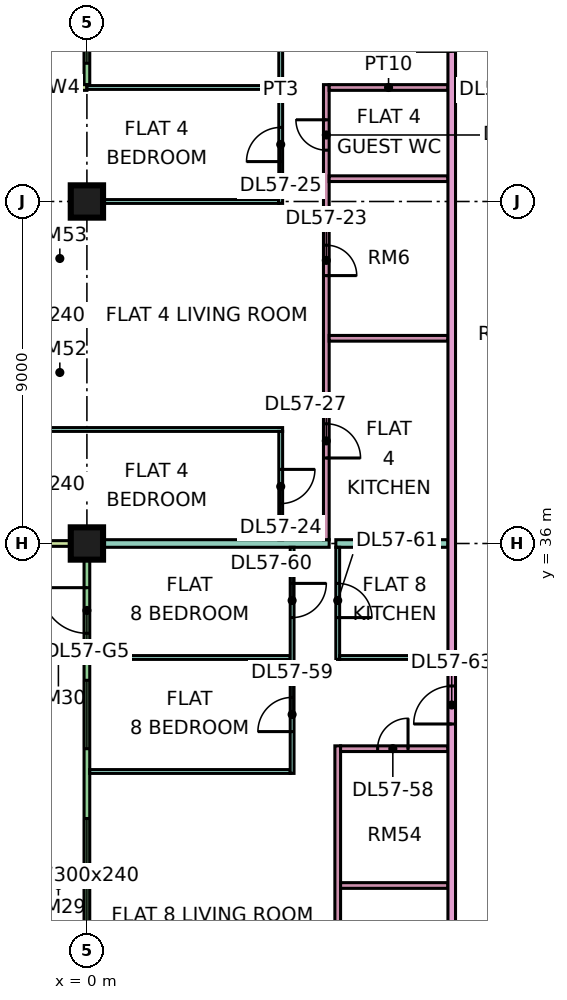
"""IFC4 building model, lengths in metres.
Left out: names, types, materials, properties, quantities, classifications, styles, units other than length and angle.
Written with IfcOpenShell. Run it as: python <this file> out.ifc"""

import sys

from ifc_helpers import new_model, si_unit, direction, frame, frame_2d, origin, origin_2d, place, context, subcontext, project, spatial, rectangle, extrude, element, fill, save


model = new_model("IFC4")
c1 = context("Model", 3, precision=1e-05, world=origin(), true_north=direction((0.0, 1.0)))
c2 = subcontext(c1, "Body", "Model", "MODEL_VIEW")
j1 = project(units=[si_unit("LENGTHUNIT", "METRE"), si_unit("PLANEANGLEUNIT", "RADIAN")], contexts=[c1])
p1 = place(None, origin())
s1 = spatial("IfcSite", under=j1, at=p1, CompositionType="ELEMENT")
p2 = place(p1, origin())
s2 = spatial("IfcBuilding", under=s1, at=p2, CompositionType="ELEMENT")
p3 = place(p2, frame((0.0, 0.0, 241.65)))
s3 = spatial("IfcBuildingStorey", under=s2, at=p3, CompositionType="ELEMENT", Elevation=241.65)
p4 = place(p3, frame((0.0, 36.0, 0.0), z_axis=(0.0, 0.0, 1.0), x_axis=(1.0, 0.0, 0.0)))
e1 = element("IfcColumn", 1, at=p4, inside=s3, PredefinedType="COLUMN", context=c2, shape_type="SweptSolid", body=[
    extrude(rectangle(XDim=0.85, YDim=0.85, at=origin_2d()), origin(), (0.0, 0.0, 1.0), 3.75),
])
p5 = place(p3, frame((0.0, 45.0, 0.0), z_axis=(0.0, 0.0, 1.0), x_axis=(1.0, 0.0, 0.0)))
e2 = element("IfcColumn", 2, at=p5, inside=s3, PredefinedType="COLUMN", context=c2, shape_type="SweptSolid", body=[
    extrude(rectangle(XDim=0.85, YDim=0.85, at=origin_2d()), origin(), (0.0, 0.0, 1.0), 3.75),
])
p6 = place(p3, frame((0.0, 61.425, 0.0), z_axis=(0.0, 0.0, 1.0), x_axis=(0.0, -1.0, 0.0)))
e3 = element("IfcWall", 3, at=p6, inside=s3, PredefinedType="SOLIDWALL", context=c2, shape_type="SweptSolid", body=[
    extrude(rectangle(XDim=13.35, YDim=0.15, at=frame_2d((6.675, 0.0))), origin(), (0.0, 0.0, 1.0), 3.35),
])
p7 = place(p6, frame((1.312, 0.0, 0.0)))
e4 = element("IfcOpeningElement", 4, at=p7, cuts=e3, PredefinedType="OPENING", context=c2, shape_type="SweptSolid", body=[
    extrude(rectangle(XDim=1.8, YDim=2.4, at=frame_2d((0.9, 1.2))), frame((0.0, 0.085, 0.0), z_axis=(0.0, -1.0, 0.0), x_axis=(1.0, 0.0, 0.0)), (0.0, 0.0, 1.0), 0.17),
])
p8 = place(p6, frame((5.062, 0.0, 0.45)))
e5 = element("IfcOpeningElement", 5, at=p8, cuts=e3, PredefinedType="OPENING", context=c2, shape_type="SweptSolid", body=[
    extrude(rectangle(XDim=1.2, YDim=2.4, at=frame_2d((0.6, 1.2))), frame((0.0, 0.085, 0.0), z_axis=(0.0, -1.0, 0.0), x_axis=(1.0, 0.0, 0.0)), (0.0, 0.0, 1.0), 0.17),
])
p9 = place(p6, frame((8.587, 0.0, 0.45)))
e6 = element("IfcOpeningElement", 6, at=p9, cuts=e3, PredefinedType="OPENING", context=c2, shape_type="SweptSolid", body=[
    extrude(rectangle(XDim=1.2, YDim=2.4, at=frame_2d((0.6, 1.2))), frame((0.0, 0.085, 0.0), z_axis=(0.0, -1.0, 0.0), x_axis=(1.0, 0.0, 0.0)), (0.0, 0.0, 1.0), 0.17),
])
p10 = place(p6, frame((10.988, 0.0, 0.45)))
e7 = element("IfcOpeningElement", 7, at=p10, cuts=e3, PredefinedType="OPENING", context=c2, shape_type="SweptSolid", body=[
    extrude(rectangle(XDim=1.8, YDim=2.4, at=frame_2d((0.9, 1.2))), frame((0.0, 0.085, 0.0), z_axis=(0.0, -1.0, 0.0), x_axis=(1.0, 0.0, 0.0)), (0.0, 0.0, 1.0), 0.17),
])
p11 = place(p3, frame((-1.5, 48.0, 0.0), z_axis=(0.0, 0.0, 1.0), x_axis=(1.0, 0.0, 0.0)))
e8 = element("IfcWall", 8, at=p11, inside=s3, PredefinedType="SOLIDWALL", context=c2, shape_type="SweptSolid", body=[
    extrude(rectangle(XDim=1.5, YDim=0.15, at=frame_2d((0.75, 0.0))), origin(), (0.0, 0.0, 1.0), 3.35),
])
p12 = place(p3, frame((0.0, 35.925, 0.0), z_axis=(0.0, 0.0, 1.0), x_axis=(0.0, -1.0, 0.0)))
e9 = element("IfcWall", 9, at=p12, inside=s3, PredefinedType="SOLIDWALL", context=c2, shape_type="SweptSolid", body=[
    extrude(rectangle(XDim=11.85, YDim=0.15, at=frame_2d((5.925, 0.0))), origin(), (0.0, 0.0, 1.0), 3.35),
])
p13 = place(p12, frame((1.087, 0.0, 0.0)))
e10 = element("IfcOpeningElement", 10, at=p13, cuts=e9, PredefinedType="OPENING", context=c2, shape_type="SweptSolid", body=[
    extrude(rectangle(XDim=1.2, YDim=2.4, at=frame_2d((0.6, 1.2))), frame((0.0, 0.085, 0.0), z_axis=(0.0, -1.0, 0.0), x_axis=(1.0, 0.0, 0.0)), (0.0, 0.0, 1.0), 0.17),
])
p14 = place(p12, frame((3.525, 0.0, 0.45)))
e11 = element("IfcOpeningElement", 11, at=p14, cuts=e9, PredefinedType="OPENING", context=c2, shape_type="SweptSolid", body=[
    extrude(rectangle(XDim=1.8, YDim=2.4, at=frame_2d((0.9, 1.2))), frame((0.0, 0.085, 0.0), z_axis=(0.0, -1.0, 0.0), x_axis=(1.0, 0.0, 0.0)), (0.0, 0.0, 1.0), 0.17),
])
p15 = place(p12, frame((7.163, 0.0, 0.45)))
e12 = element("IfcOpeningElement", 12, at=p15, cuts=e9, PredefinedType="OPENING", context=c2, shape_type="SweptSolid", body=[
    extrude(rectangle(XDim=3.0, YDim=2.4, at=frame_2d((1.5, 1.2))), frame((0.0, 0.085, 0.0), z_axis=(0.0, -1.0, 0.0), x_axis=(1.0, 0.0, 0.0)), (0.0, 0.0, 1.0), 0.17),
])
p16 = place(p3, frame((-1.5, 36.0, 0.0), z_axis=(0.0, 0.0, 1.0), x_axis=(1.0, 0.0, 0.0)))
e13 = element("IfcWall", 13, at=p16, inside=s3, PredefinedType="SOLIDWALL", context=c2, shape_type="SweptSolid", body=[
    extrude(rectangle(XDim=1.5, YDim=0.15, at=frame_2d((0.75, 0.0))), origin(), (0.0, 0.0, 1.0), 3.35),
])
e14 = element("IfcWall", 14, at=p4, inside=s3, PredefinedType="PARTITIONING", context=c2, shape_type="SweptSolid", body=[
    extrude(rectangle(XDim=6.375, YDim=0.2, at=frame_2d((3.188, 0.0))), origin(), (0.0, 0.0, 1.0), 3.35),
])
p17 = place(p3, frame((-1.35, 39.0, 0.0), z_axis=(0.0, 0.0, 1.0), x_axis=(1.0, 0.0, 0.0)))
e15 = element("IfcWall", 15, at=p17, inside=s3, PredefinedType="PARTITIONING", context=c2, shape_type="SweptSolid", body=[
    extrude(rectangle(XDim=6.5, YDim=0.1, at=frame_2d((3.25, 0.0))), origin(), (0.0, 0.0, 1.0), 3.35),
])
e16 = element("IfcWall", 16, at=p5, inside=s3, PredefinedType="PARTITIONING", context=c2, shape_type="SweptSolid", body=[
    extrude(rectangle(XDim=5.05, YDim=0.1, at=frame_2d((2.525, 0.0))), origin(), (0.0, 0.0, 1.0), 3.35),
])
p18 = place(p3, frame((0.0, 48.0, 0.0), z_axis=(0.0, 0.0, 1.0), x_axis=(1.0, 0.0, 0.0)))
e17 = element("IfcWall", 17, at=p18, inside=s3, PredefinedType="PARTITIONING", context=c2, shape_type="SweptSolid", body=[
    extrude(rectangle(XDim=5.05, YDim=0.1, at=frame_2d((2.525, 0.0))), origin(), (0.0, 0.0, 1.0), 3.35),
])
for number, where, z_axis, x_axis in (
    (18, (0.074, 30.0, 0.0), (0.0, 0.0, 1.0), (1.0, 0.0, 0.0)),
    (19, (0.074, 33.0, 0.0), (0.0, 0.0, 1.0), (1.0, 0.0, 0.0)),
):
    element("IfcWall", number, at=place(p3, frame(where, z_axis=z_axis, x_axis=x_axis)), inside=s3, PredefinedType="PARTITIONING", context=c2, shape_type="SweptSolid", body=[
        extrude(rectangle(XDim=5.276, YDim=0.1, at=frame_2d((2.638, 0.0))), origin(), (0.0, 0.0, 1.0), 3.35),
    ])
p19 = place(p3, frame((5.1, 36.1, 0.0), z_axis=(0.0, 0.0, 1.0), x_axis=(0.0, 1.0, 0.0)))
e20 = element("IfcWall", 20, at=p19, inside=s3, PredefinedType="PARTITIONING", context=c2, shape_type="SweptSolid", body=[
    extrude(rectangle(XDim=2.85, YDim=0.1, at=frame_2d((1.425, 0.0))), origin(), (0.0, 0.0, 1.0), 3.35),
])
p20 = place(p19, frame((0.95, 0.0, 0.0)))
e21 = element("IfcOpeningElement", 21, at=p20, cuts=e20, PredefinedType="OPENING", context=c2, shape_type="SweptSolid", body=[
    extrude(rectangle(XDim=0.9, YDim=2.1, at=frame_2d((0.45, 1.05))), frame((0.0, 0.06, 0.0), z_axis=(0.0, -1.0, 0.0), x_axis=(1.0, 0.0, 0.0)), (0.0, 0.0, 1.0), 0.12),
])
p21 = place(p3, frame((5.1, 44.95, 0.0), z_axis=(0.0, 0.0, 1.0), x_axis=(0.0, 1.0, 0.0)))
e22 = element("IfcWall", 22, at=p21, inside=s3, PredefinedType="PARTITIONING", context=c2, shape_type="SweptSolid", body=[
    extrude(rectangle(XDim=5.95, YDim=0.1, at=frame_2d((2.975, 0.0))), origin(), (0.0, 0.0, 1.0), 3.35),
])
p22 = place(p21, frame((1.1, 0.0, 0.0)))
e23 = element("IfcOpeningElement", 23, at=p22, cuts=e22, PredefinedType="OPENING", context=c2, shape_type="SweptSolid", body=[
    extrude(rectangle(XDim=0.9, YDim=2.1, at=frame_2d((0.45, 1.05))), frame((0.0, 0.06, 0.0), z_axis=(0.0, -1.0, 0.0), x_axis=(1.0, 0.0, 0.0)), (0.0, 0.0, 1.0), 0.12),
])
p23 = place(p21, frame((4.1, 0.0, 0.0)))
e24 = element("IfcOpeningElement", 24, at=p23, cuts=e22, PredefinedType="OPENING", context=c2, shape_type="SweptSolid", body=[
    extrude(rectangle(XDim=0.9, YDim=2.1, at=frame_2d((0.45, 1.05))), frame((0.0, 0.06, 0.0), z_axis=(0.0, -1.0, 0.0), x_axis=(1.0, 0.0, 0.0)), (0.0, 0.0, 1.0), 0.12),
])
p24 = place(p3, frame((5.4, 29.95, 0.0), z_axis=(0.0, 0.0, 1.0), x_axis=(0.0, 1.0, 0.0)))
e25 = element("IfcWall", 25, at=p24, inside=s3, PredefinedType="PARTITIONING", context=c2, shape_type="SweptSolid", body=[
    extrude(rectangle(XDim=5.95, YDim=0.1, at=frame_2d((2.975, 0.0))), origin(), (0.0, 0.0, 1.0), 3.35),
])
p25 = place(p24, frame((1.1, 0.0, 0.0)))
e26 = element("IfcOpeningElement", 26, at=p25, cuts=e25, PredefinedType="OPENING", context=c2, shape_type="SweptSolid", body=[
    extrude(rectangle(XDim=0.9, YDim=2.1, at=frame_2d((0.45, 1.05))), frame((0.0, 0.06, 0.0), z_axis=(0.0, -1.0, 0.0), x_axis=(1.0, 0.0, 0.0)), (0.0, 0.0, 1.0), 0.12),
])
p26 = place(p24, frame((4.1, 0.0, 0.0)))
e27 = element("IfcOpeningElement", 27, at=p26, cuts=e25, PredefinedType="OPENING", context=c2, shape_type="SweptSolid", body=[
    extrude(rectangle(XDim=0.9, YDim=2.1, at=frame_2d((0.45, 1.05))), frame((0.0, 0.06, 0.0), z_axis=(0.0, -1.0, 0.0), x_axis=(1.0, 0.0, 0.0)), (0.0, 0.0, 1.0), 0.12),
])
p27 = place(p3, frame((6.3, 36.1, 0.0), z_axis=(0.0, 0.0, 1.0), x_axis=(0.0, 1.0, 0.0)))
e28 = element("IfcWall", 28, at=p27, inside=s3, PredefinedType="PARTITIONING", context=c2, shape_type="SweptSolid", body=[
    extrude(rectangle(XDim=11.975, YDim=0.15, at=frame_2d((5.987, 0.0))), origin(), (0.0, 0.0, 1.0), 3.35),
])
p28 = place(p27, frame((6.95, 0.0, 0.0)))
e29 = element("IfcOpeningElement", 29, at=p28, cuts=e28, PredefinedType="OPENING", context=c2, shape_type="SweptSolid", body=[
    extrude(rectangle(XDim=0.8, YDim=2.1, at=frame_2d((0.4, 1.05))), frame((0.0, 0.085, 0.0), z_axis=(0.0, -1.0, 0.0), x_axis=(1.0, 0.0, 0.0)), (0.0, 0.0, 1.0), 0.17),
])
p29 = place(p27, frame((2.15, 0.0, 0.0)))
e30 = element("IfcOpeningElement", 30, at=p29, cuts=e28, PredefinedType="OPENING", context=c2, shape_type="SweptSolid", body=[
    extrude(rectangle(XDim=0.9, YDim=2.1, at=frame_2d((0.45, 1.05))), frame((0.0, 0.085, 0.0), z_axis=(0.0, -1.0, 0.0), x_axis=(1.0, 0.0, 0.0)), (0.0, 0.0, 1.0), 0.17),
])
p30 = place(p27, frame((10.25, 0.0, 0.0)))
e31 = element("IfcOpeningElement", 31, at=p30, cuts=e28, PredefinedType="OPENING", context=c2, shape_type="SweptSolid", body=[
    extrude(rectangle(XDim=0.8, YDim=2.1, at=frame_2d((0.4, 1.05))), frame((0.0, 0.085, 0.0), z_axis=(0.0, -1.0, 0.0), x_axis=(1.0, 0.0, 0.0)), (0.0, 0.0, 1.0), 0.17),
])
for number, where, z_axis, x_axis in (
    (32, (6.375, 41.4, 0.0), (0.0, 0.0, 1.0), (1.0, 0.0, 0.0)),
    (33, (6.375, 45.6, 0.0), (0.0, 0.0, 1.0), (1.0, 0.0, 0.0)),
    (34, (6.375, 48.0, 0.0), (0.0, 0.0, 1.0), (1.0, 0.0, 0.0)),
):
    element("IfcWall", number, at=place(p3, frame(where, z_axis=z_axis, x_axis=x_axis)), inside=s3, PredefinedType="PARTITIONING", context=c2, shape_type="SweptSolid", body=[
        extrude(rectangle(XDim=3.125, YDim=0.15, at=frame_2d((1.562, 0.0))), origin(), (0.0, 0.0, 1.0), 3.35),
    ])
p31 = place(p3, frame((6.55, 36.0, 0.0), z_axis=(0.0, 0.0, 1.0), x_axis=(1.0, 0.0, 0.0)))
e35 = element("IfcWall", 35, at=p31, inside=s3, PredefinedType="PARTITIONING", context=c2, shape_type="SweptSolid", body=[
    extrude(rectangle(XDim=2.95, YDim=0.2, at=frame_2d((1.475, 0.0))), origin(), (0.0, 0.0, 1.0), 3.35),
])
p32 = place(p3, frame((6.6, 22.5, 0.0), z_axis=(0.0, 0.0, 1.0), x_axis=(0.0, 1.0, 0.0)))
e36 = element("IfcWall", 36, at=p32, inside=s3, PredefinedType="PARTITIONING", context=c2, shape_type="SweptSolid", body=[
    extrude(rectangle(XDim=8.175, YDim=0.15, at=frame_2d((4.087, 0.0))), origin(), (0.0, 0.0, 1.0), 3.35),
])
p33 = place(p32, frame((1.85, 0.0, 0.0)))
e37 = element("IfcOpeningElement", 37, at=p33, cuts=e36, PredefinedType="OPENING", context=c2, shape_type="SweptSolid", body=[
    extrude(rectangle(XDim=0.8, YDim=2.1, at=frame_2d((0.4, 1.05))), frame((0.0, 0.085, 0.0), z_axis=(0.0, -1.0, 0.0), x_axis=(1.0, 0.0, 0.0)), (0.0, 0.0, 1.0), 0.17),
])
p34 = place(p3, frame((6.6, 32.95, 0.0), z_axis=(0.0, 0.0, 1.0), x_axis=(0.0, 1.0, 0.0)))
e38 = element("IfcWall", 38, at=p34, inside=s3, PredefinedType="PARTITIONING", context=c2, shape_type="SweptSolid", body=[
    extrude(rectangle(XDim=2.95, YDim=0.1, at=frame_2d((1.475, 0.0))), origin(), (0.0, 0.0, 1.0), 3.35),
])
p35 = place(p34, frame((1.1, 0.0, 0.0)))
e39 = element("IfcOpeningElement", 39, at=p35, cuts=e38, PredefinedType="OPENING", context=c2, shape_type="SweptSolid", body=[
    extrude(rectangle(XDim=0.9, YDim=2.1, at=frame_2d((0.45, 1.05))), frame((0.0, 0.06, 0.0), z_axis=(0.0, -1.0, 0.0), x_axis=(1.0, 0.0, 0.0)), (0.0, 0.0, 1.0), 0.12),
])
p36 = place(p3, frame((6.65, 33.0, 0.0), z_axis=(0.0, 0.0, 1.0), x_axis=(1.0, 0.0, 0.0)))
e40 = element("IfcWall", 40, at=p36, inside=s3, PredefinedType="PARTITIONING", context=c2, shape_type="SweptSolid", body=[
    extrude(rectangle(XDim=2.85, YDim=0.1, at=frame_2d((1.425, 0.0))), origin(), (0.0, 0.0, 1.0), 3.35),
])
p37 = place(p3, frame((6.675, 27.0, 0.0), z_axis=(0.0, 0.0, 1.0), x_axis=(1.0, 0.0, 0.0)))
e41 = element("IfcWall", 41, at=p37, inside=s3, PredefinedType="PARTITIONING", context=c2, shape_type="SweptSolid", body=[
    extrude(rectangle(XDim=2.825, YDim=0.15, at=frame_2d((1.413, 0.0))), origin(), (0.0, 0.0, 1.0), 3.35),
])
p38 = place(p3, frame((6.675, 30.6, 0.0), z_axis=(0.0, 0.0, 1.0), x_axis=(1.0, 0.0, 0.0)))
e42 = element("IfcWall", 42, at=p38, inside=s3, PredefinedType="PARTITIONING", context=c2, shape_type="SweptSolid", body=[
    extrude(rectangle(XDim=2.825, YDim=0.15, at=frame_2d((1.413, 0.0))), origin(), (0.0, 0.0, 1.0), 3.35),
])
p39 = place(p38, frame((0.975, 0.0, 0.0)))
e43 = element("IfcOpeningElement", 43, at=p39, cuts=e42, PredefinedType="OPENING", context=c2, shape_type="SweptSolid", body=[
    extrude(rectangle(XDim=0.8, YDim=2.1, at=frame_2d((0.4, 1.05))), frame((0.0, 0.085, 0.0), z_axis=(0.0, -1.0, 0.0), x_axis=(1.0, 0.0, 0.0)), (0.0, 0.0, 1.0), 0.17),
])
p40 = place(p3, frame((9.6, 20.0, 0.0), z_axis=(0.0, 0.0, 1.0), x_axis=(0.0, 1.0, 0.0)))
e44 = element("IfcWall", 44, at=p40, inside=s3, PredefinedType="PARTITIONING", context=c2, shape_type="SweptSolid", body=[
    extrude(rectangle(XDim=42.926, YDim=0.2, at=frame_2d((21.463, 0.0))), origin(), (0.0, 0.0, 1.0), 3.35),
])
p41 = place(p40, frame((28.95, 0.0, 0.0)))
e45 = element("IfcOpeningElement", 45, at=p41, cuts=e44, PredefinedType="OPENING", context=c2, shape_type="SweptSolid", body=[
    extrude(rectangle(XDim=1.0, YDim=2.1, at=frame_2d((0.5, 1.05))), frame((0.0, 0.11, 0.0), z_axis=(0.0, -1.0, 0.0), x_axis=(1.0, 0.0, 0.0)), (0.0, 0.0, 1.0), 0.22),
])
p42 = place(p40, frame((31.95, 0.0, 0.0)))
e46 = element("IfcOpeningElement", 46, at=p42, cuts=e44, PredefinedType="OPENING", context=c2, shape_type="SweptSolid", body=[
    extrude(rectangle(XDim=1.0, YDim=2.1, at=frame_2d((0.5, 1.05))), frame((0.0, 0.11, 0.0), z_axis=(0.0, -1.0, 0.0), x_axis=(1.0, 0.0, 0.0)), (0.0, 0.0, 1.0), 0.22),
])
p43 = place(p40, frame((0.6, 0.0, 0.0)))
e47 = element("IfcOpeningElement", 47, at=p43, cuts=e44, PredefinedType="OPENING", context=c2, shape_type="SweptSolid", body=[
    extrude(rectangle(XDim=1.2, YDim=2.1, at=frame_2d((0.6, 1.05))), frame((0.0, 0.11, 0.0), z_axis=(0.0, -1.0, 0.0), x_axis=(1.0, 0.0, 0.0)), (0.0, 0.0, 1.0), 0.22),
])
p44 = place(p40, frame((11.25, 0.0, 0.0)))
e48 = element("IfcOpeningElement", 48, at=p44, cuts=e44, PredefinedType="OPENING", context=c2, shape_type="SweptSolid", body=[
    extrude(rectangle(XDim=1.0, YDim=2.1, at=frame_2d((0.5, 1.05))), frame((0.0, 0.11, 0.0), z_axis=(0.0, -1.0, 0.0), x_axis=(1.0, 0.0, 0.0)), (0.0, 0.0, 1.0), 0.22),
])
p45 = place(p10, origin())
e49 = element("IfcWindow", 49, at=p45, inside=s3, PartitioningType="SINGLE_PANEL", PredefinedType="WINDOW", context=c2, shape_type="SweptSolid", body=[
    extrude(rectangle(XDim=1.8, YDim=2.4, at=frame_2d((0.9, 1.2))), frame((0.0, 0.03, 0.0), z_axis=(0.0, -1.0, 0.0), x_axis=(1.0, 0.0, 0.0)), (0.0, 0.0, 1.0), 0.06),
])
fill(e7, e49)
p46 = place(p13, frame((1.2, 0.0, 0.0), z_axis=(0.0, 0.0, 1.0), x_axis=(-1.0, 0.0, 0.0)))
e50 = element("IfcDoor", 50, at=p46, inside=s3, OperationType="DOUBLE_DOOR_SINGLE_SWING", PredefinedType="DOOR", context=c2, shape_type="SweptSolid", body=[
    extrude(rectangle(XDim=1.2, YDim=2.4, at=frame_2d((0.6, 1.2))), frame((0.0, 0.025, 0.0), z_axis=(0.0, -1.0, 0.0), x_axis=(1.0, 0.0, 0.0)), (0.0, 0.0, 1.0), 0.05),
])
fill(e10, e50)
p47 = place(p14, origin())
e51 = element("IfcWindow", 51, at=p47, inside=s3, PartitioningType="SINGLE_PANEL", PredefinedType="WINDOW", context=c2, shape_type="SweptSolid", body=[
    extrude(rectangle(XDim=1.8, YDim=2.4, at=frame_2d((0.9, 1.2))), frame((0.0, 0.03, 0.0), z_axis=(0.0, -1.0, 0.0), x_axis=(1.0, 0.0, 0.0)), (0.0, 0.0, 1.0), 0.06),
])
fill(e11, e51)
p48 = place(p15, origin())
e52 = element("IfcWindow", 52, at=p48, inside=s3, PartitioningType="SINGLE_PANEL", PredefinedType="WINDOW", context=c2, shape_type="SweptSolid", body=[
    extrude(rectangle(XDim=3.0, YDim=2.4, at=frame_2d((1.5, 1.2))), frame((0.0, 0.03, 0.0), z_axis=(0.0, -1.0, 0.0), x_axis=(1.0, 0.0, 0.0)), (0.0, 0.0, 1.0), 0.06),
])
fill(e12, e52)
p49 = place(p28, frame((0.8, 0.0, 0.0), z_axis=(0.0, 0.0, 1.0), x_axis=(-1.0, 0.0, 0.0)))
e53 = element("IfcDoor", 53, at=p49, inside=s3, OperationType="SINGLE_SWING_LEFT", PredefinedType="DOOR", context=c2, shape_type="SweptSolid", body=[
    extrude(rectangle(XDim=0.8, YDim=2.1, at=frame_2d((0.4, 1.05))), frame((0.0, 0.025, 0.0), z_axis=(0.0, -1.0, 0.0), x_axis=(1.0, 0.0, 0.0)), (0.0, 0.0, 1.0), 0.05),
])
fill(e29, e53)
p50 = place(p20, origin())
e54 = element("IfcDoor", 54, at=p50, inside=s3, OperationType="SINGLE_SWING_RIGHT", PredefinedType="DOOR", context=c2, shape_type="SweptSolid", body=[
    extrude(rectangle(XDim=0.9, YDim=2.1, at=frame_2d((0.45, 1.05))), frame((0.0, 0.025, 0.0), z_axis=(0.0, -1.0, 0.0), x_axis=(1.0, 0.0, 0.0)), (0.0, 0.0, 1.0), 0.05),
])
fill(e21, e54)
p51 = place(p22, origin())
e55 = element("IfcDoor", 55, at=p51, inside=s3, OperationType="SINGLE_SWING_LEFT", PredefinedType="DOOR", context=c2, shape_type="SweptSolid", body=[
    extrude(rectangle(XDim=0.9, YDim=2.1, at=frame_2d((0.45, 1.05))), frame((0.0, 0.025, 0.0), z_axis=(0.0, -1.0, 0.0), x_axis=(1.0, 0.0, 0.0)), (0.0, 0.0, 1.0), 0.05),
])
fill(e23, e55)
p52 = place(p29, frame((0.9, 0.0, 0.0), z_axis=(0.0, 0.0, 1.0), x_axis=(-1.0, 0.0, 0.0)))
e56 = element("IfcDoor", 56, at=p52, inside=s3, OperationType="SINGLE_SWING_LEFT", PredefinedType="DOOR", context=c2, shape_type="SweptSolid", body=[
    extrude(rectangle(XDim=0.9, YDim=2.1, at=frame_2d((0.45, 1.05))), frame((0.0, 0.025, 0.0), z_axis=(0.0, -1.0, 0.0), x_axis=(1.0, 0.0, 0.0)), (0.0, 0.0, 1.0), 0.05),
])
fill(e30, e56)
p53 = place(p30, frame((0.8, 0.0, 0.0), z_axis=(0.0, 0.0, 1.0), x_axis=(-1.0, 0.0, 0.0)))
e57 = element("IfcDoor", 57, at=p53, inside=s3, OperationType="SINGLE_SWING_RIGHT", PredefinedType="DOOR", context=c2, shape_type="SweptSolid", body=[
    extrude(rectangle(XDim=0.8, YDim=2.1, at=frame_2d((0.4, 1.05))), frame((0.0, 0.025, 0.0), z_axis=(0.0, -1.0, 0.0), x_axis=(1.0, 0.0, 0.0)), (0.0, 0.0, 1.0), 0.05),
])
fill(e31, e57)
p54 = place(p39, frame((0.8, 0.0, 0.0), z_axis=(0.0, 0.0, 1.0), x_axis=(-1.0, 0.0, 0.0)))
e58 = element("IfcDoor", 58, at=p54, inside=s3, OperationType="SINGLE_SWING_RIGHT", PredefinedType="DOOR", context=c2, shape_type="SweptSolid", body=[
    extrude(rectangle(XDim=0.8, YDim=2.1, at=frame_2d((0.4, 1.05))), frame((0.0, 0.025, 0.0), z_axis=(0.0, -1.0, 0.0), x_axis=(1.0, 0.0, 0.0)), (0.0, 0.0, 1.0), 0.05),
])
fill(e43, e58)
p55 = place(p25, origin())
e59 = element("IfcDoor", 59, at=p55, inside=s3, OperationType="SINGLE_SWING_LEFT", PredefinedType="DOOR", context=c2, shape_type="SweptSolid", body=[
    extrude(rectangle(XDim=0.9, YDim=2.1, at=frame_2d((0.45, 1.05))), frame((0.0, 0.025, 0.0), z_axis=(0.0, -1.0, 0.0), x_axis=(1.0, 0.0, 0.0)), (0.0, 0.0, 1.0), 0.05),
])
fill(e26, e59)
p56 = place(p26, origin())
e60 = element("IfcDoor", 60, at=p56, inside=s3, OperationType="SINGLE_SWING_RIGHT", PredefinedType="DOOR", context=c2, shape_type="SweptSolid", body=[
    extrude(rectangle(XDim=0.9, YDim=2.1, at=frame_2d((0.45, 1.05))), frame((0.0, 0.025, 0.0), z_axis=(0.0, -1.0, 0.0), x_axis=(1.0, 0.0, 0.0)), (0.0, 0.0, 1.0), 0.05),
])
fill(e27, e60)
p57 = place(p35, frame((0.9, 0.0, 0.0), z_axis=(0.0, 0.0, 1.0), x_axis=(-1.0, 0.0, 0.0)))
e61 = element("IfcDoor", 61, at=p57, inside=s3, OperationType="SINGLE_SWING_LEFT", PredefinedType="DOOR", context=c2, shape_type="SweptSolid", body=[
    extrude(rectangle(XDim=0.9, YDim=2.1, at=frame_2d((0.45, 1.05))), frame((0.0, 0.025, 0.0), z_axis=(0.0, -1.0, 0.0), x_axis=(1.0, 0.0, 0.0)), (0.0, 0.0, 1.0), 0.05),
])
fill(e39, e61)
p58 = place(p44, origin())
e62 = element("IfcDoor", 62, at=p58, inside=s3, OperationType="SINGLE_SWING_LEFT", PredefinedType="DOOR", context=c2, shape_type="SweptSolid", body=[
    extrude(rectangle(XDim=1.0, YDim=2.1, at=frame_2d((0.5, 1.05))), frame((0.0, 0.025, 0.0), z_axis=(0.0, -1.0, 0.0), x_axis=(1.0, 0.0, 0.0)), (0.0, 0.0, 1.0), 0.05),
])
fill(e48, e62)
save(model, sys.argv[1])
